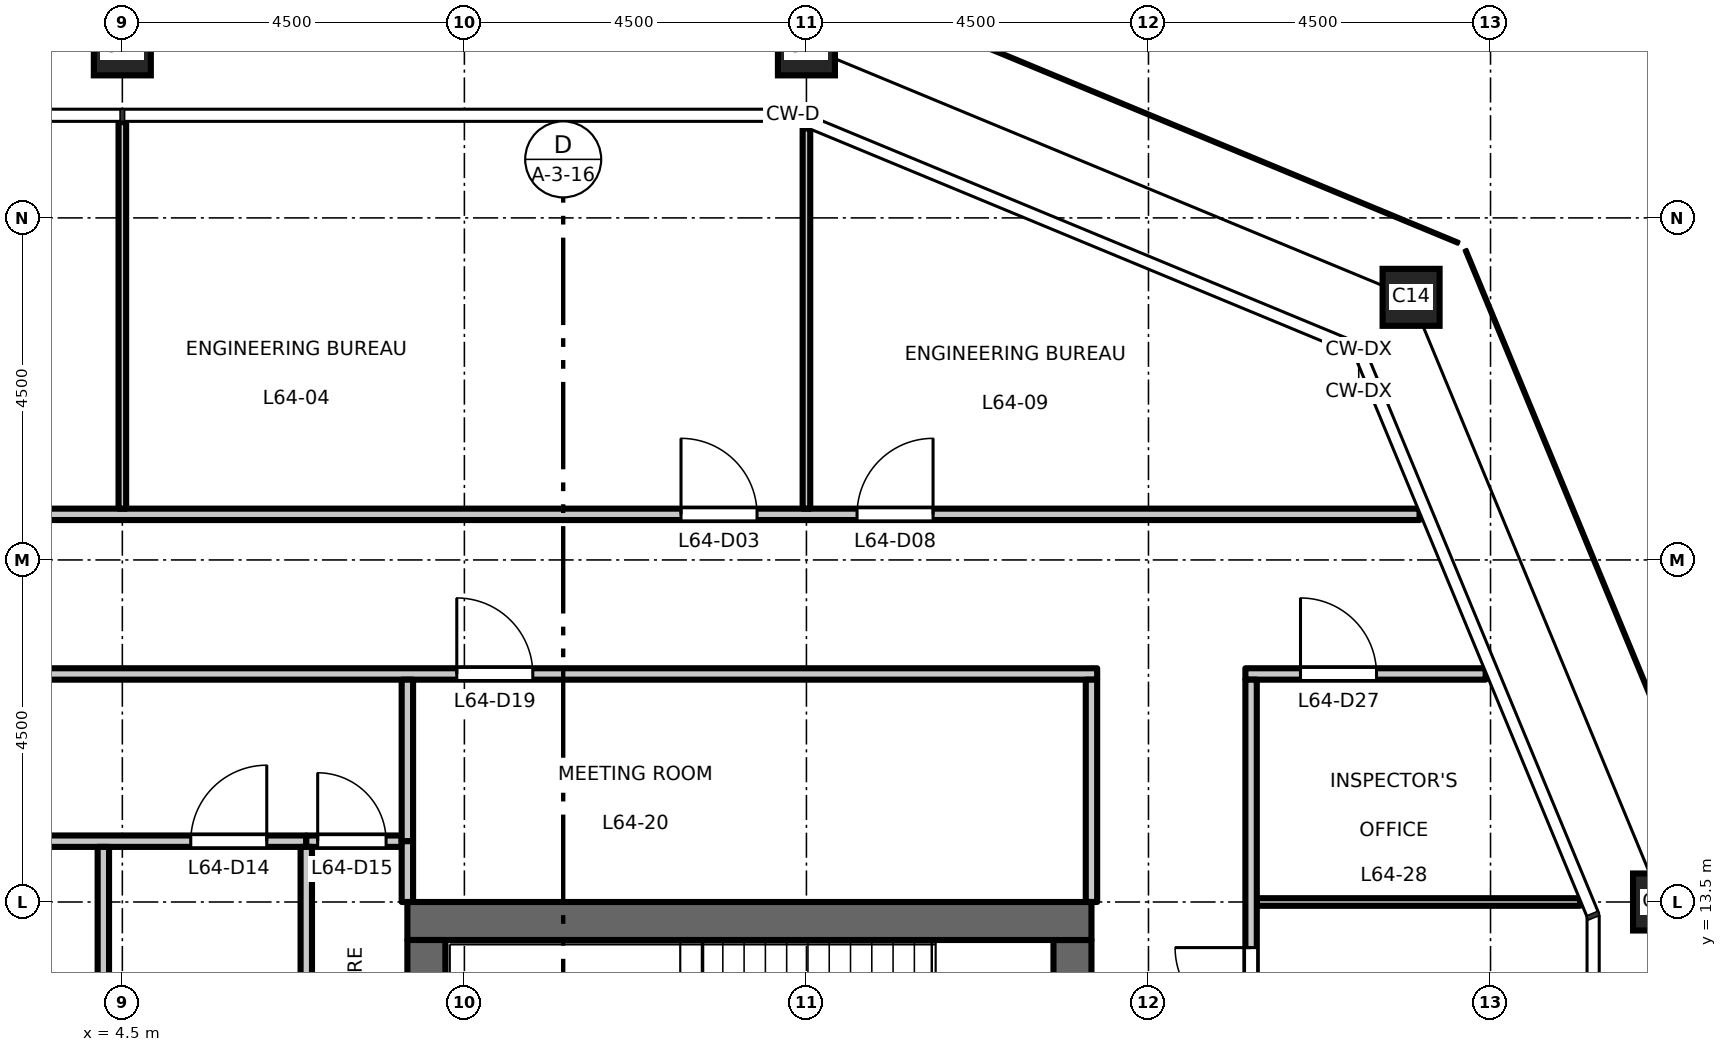
"""IFC4 building model, lengths in metres.
Left out: names, types, materials, properties, quantities, classifications, styles, units other than length and angle.
Written with IfcOpenShell. Run it as: python <this file> out.ifc"""

import sys

from ifc_helpers import new_model, si_unit, direction, frame, frame_2d, origin, origin_2d, place, context, subcontext, project, spatial, rectangle, hollow_rectangle, extrude, element, fill, save


model = new_model("IFC4")
c1 = context("Model", 3, precision=1e-05, world=origin(), true_north=direction((0.0, 1.0)))
c2 = subcontext(c1, "Body", "Model", "MODEL_VIEW")
j1 = project(units=[si_unit("LENGTHUNIT", "METRE"), si_unit("PLANEANGLEUNIT", "RADIAN")], contexts=[c1])
p1 = place(None, origin())
s1 = spatial("IfcSite", under=j1, at=p1, CompositionType="ELEMENT")
p2 = place(p1, origin())
s2 = spatial("IfcBuilding", under=s1, at=p2, CompositionType="ELEMENT")
p3 = place(p2, frame((0.0, 0.0, 298.7)))
s3 = spatial("IfcBuildingStorey", under=s2, at=p3, CompositionType="ELEMENT", Elevation=298.7)
for number, where, z_axis, x_axis in (
    (1, (24.75, 13.5, 0.0), (0.0, 0.0, 1.0), (1.0, 0.0, 0.0)),
    (2, (21.455, 21.455, 0.0), (0.0, 0.0, 1.0), (1.0, 0.0, 0.0)),
    (3, (13.5, 24.75, 0.0), (0.0, 0.0, 1.0), (1.0, 0.0, 0.0)),
    (4, (4.5, 24.75, 0.0), (0.0, 0.0, 1.0), (1.0, 0.0, 0.0)),
):
    element("IfcColumn", number, at=place(p3, frame(where, z_axis=z_axis, x_axis=x_axis)), inside=s3, PredefinedType="COLUMN", context=c2, shape_type="SweptSolid", body=[
        extrude(hollow_rectangle(XDim=0.75, YDim=0.75, WallThickness=0.04, at=origin_2d()), origin(), (0.0, 0.0, 1.0), 4.5),
    ])
p4 = place(p3, frame((17.0, -13.0, 0.0), z_axis=(0.0, 0.0, 1.0), x_axis=(0.0, 1.0, 0.0)))
e5 = element("IfcWall", 5, at=p4, inside=s3, PredefinedType="SHEAR", context=c2, shape_type="SweptSolid", body=[
    extrude(rectangle(XDim=26.0, YDim=0.5, at=frame_2d((13.0, 0.0))), origin(), (0.0, 0.0, 1.0), 4.35),
])
p5 = place(p4, frame((16.825, 0.0, 0.0)))
e6 = element("IfcOpeningElement", 6, at=p5, cuts=e5, PredefinedType="OPENING", context=c2, shape_type="SweptSolid", body=[
    extrude(rectangle(XDim=1.8, YDim=2.1, at=frame_2d((0.9, 1.05))), frame((0.0, 0.26, 0.0), z_axis=(0.0, -1.0, 0.0), x_axis=(1.0, 0.0, 0.0)), (0.0, 0.0, 1.0), 0.52),
])
p6 = place(p4, frame((7.375, 0.0, 0.0)))
e7 = element("IfcOpeningElement", 7, at=p6, cuts=e5, PredefinedType="OPENING", context=c2, shape_type="SweptSolid", body=[
    extrude(rectangle(XDim=1.8, YDim=2.1, at=frame_2d((0.9, 1.05))), frame((0.0, 0.26, 0.0), z_axis=(0.0, -1.0, 0.0), x_axis=(1.0, 0.0, 0.0)), (0.0, 0.0, 1.0), 0.52),
])
p7 = place(p3, frame((8.25, 13.25, 0.0), z_axis=(0.0, 0.0, 1.0), x_axis=(1.0, 0.0, 0.0)))
e8 = element("IfcWall", 8, at=p7, inside=s3, PredefinedType="SHEAR", context=c2, shape_type="SweptSolid", body=[
    extrude(rectangle(XDim=9.0, YDim=0.5, at=frame_2d((4.5, 0.0))), origin(), (0.0, 0.0, 1.0), 4.35),
])
p8 = place(p3, frame((8.5, -13.0, 0.0), z_axis=(0.0, 0.0, 1.0), x_axis=(0.0, 1.0, 0.0)))
e9 = element("IfcWall", 9, at=p8, inside=s3, PredefinedType="SHEAR", context=c2, shape_type="SweptSolid", body=[
    extrude(rectangle(XDim=26.0, YDim=0.5, at=frame_2d((13.0, 0.0))), origin(), (0.0, 0.0, 1.0), 4.35),
])
p9 = place(p3, frame((19.425, 13.5, 0.0), z_axis=(0.0, 0.0, 1.0), x_axis=(1.0, 0.0, 0.0)))
e10 = element("IfcWall", 10, at=p9, inside=s3, PredefinedType="PARTITIONING", context=c2, shape_type="SweptSolid", body=[
    extrude(rectangle(XDim=4.253, YDim=0.1, at=frame_2d((2.126, 0.0))), origin(), (0.0, 0.0, 1.0), 4.35),
])
p10 = place(p3, frame((-8.175, 14.3, 0.0), z_axis=(0.0, 0.0, 1.0), x_axis=(1.0, 0.0, 0.0)))
e11 = element("IfcWall", 11, at=p10, inside=s3, PredefinedType="PARTITIONING", context=c2, shape_type="SweptSolid", body=[
    extrude(rectangle(XDim=15.095, YDim=0.15, at=frame_2d((7.547, 0.0))), origin(), (0.0, 0.0, 1.0), 4.35),
])
p11 = place(p10, frame((4.575, 0.0, 0.0)))
e12 = element("IfcOpeningElement", 12, at=p11, cuts=e11, PredefinedType="OPENING", context=c2, shape_type="SweptSolid", body=[
    extrude(rectangle(XDim=1.0, YDim=2.1, at=frame_2d((0.5, 1.05))), frame((0.0, 0.085, 0.0), z_axis=(0.0, -1.0, 0.0), x_axis=(1.0, 0.0, 0.0)), (0.0, 0.0, 1.0), 0.17),
])
p12 = place(p10, frame((6.825, 0.0, 0.0)))
e13 = element("IfcOpeningElement", 13, at=p12, cuts=e11, PredefinedType="OPENING", context=c2, shape_type="SweptSolid", body=[
    extrude(rectangle(XDim=1.0, YDim=2.1, at=frame_2d((0.5, 1.05))), frame((0.0, 0.085, 0.0), z_axis=(0.0, -1.0, 0.0), x_axis=(1.0, 0.0, 0.0)), (0.0, 0.0, 1.0), 0.17),
])
p13 = place(p10, frame((13.575, 0.0, 0.0)))
e14 = element("IfcOpeningElement", 14, at=p13, cuts=e11, PredefinedType="OPENING", context=c2, shape_type="SweptSolid", body=[
    extrude(rectangle(XDim=1.0, YDim=2.1, at=frame_2d((0.5, 1.05))), frame((0.0, 0.085, 0.0), z_axis=(0.0, -1.0, 0.0), x_axis=(1.0, 0.0, 0.0)), (0.0, 0.0, 1.0), 0.17),
])
p14 = place(p3, frame((6.92, 14.3, 0.0), z_axis=(0.0, 0.0, 1.0), x_axis=(1.0, 0.0, 0.0)))
e15 = element("IfcWall", 15, at=p14, inside=s3, PredefinedType="PARTITIONING", context=c2, shape_type="SweptSolid", body=[
    extrude(rectangle(XDim=1.255, YDim=0.15, at=frame_2d((0.627, 0.0))), origin(), (0.0, 0.0, 1.0), 4.35),
])
p15 = place(p14, frame((0.15, 0.0, 0.0)))
e16 = element("IfcOpeningElement", 16, at=p15, cuts=e15, PredefinedType="OPENING", context=c2, shape_type="SweptSolid", body=[
    extrude(rectangle(XDim=0.9, YDim=2.1, at=frame_2d((0.45, 1.05))), frame((0.0, 0.085, 0.0), z_axis=(0.0, -1.0, 0.0), x_axis=(1.0, 0.0, 0.0)), (0.0, 0.0, 1.0), 0.17),
])
p16 = place(p3, frame((-17.325, 16.5, 0.0), z_axis=(0.0, 0.0, 1.0), x_axis=(1.0, 0.0, 0.0)))
e17 = element("IfcWall", 17, at=p16, inside=s3, PredefinedType="PARTITIONING", context=c2, shape_type="SweptSolid", body=[
    extrude(rectangle(XDim=34.65, YDim=0.15, at=frame_2d((17.325, 0.0))), origin(), (0.0, 0.0, 1.0), 4.35),
])
p17 = place(p16, frame((9.725, 0.0, 0.0)))
e18 = element("IfcOpeningElement", 18, at=p17, cuts=e17, PredefinedType="OPENING", context=c2, shape_type="SweptSolid", body=[
    extrude(rectangle(XDim=1.0, YDim=2.1, at=frame_2d((0.5, 1.05))), frame((0.0, 0.085, 0.0), z_axis=(0.0, -1.0, 0.0), x_axis=(1.0, 0.0, 0.0)), (0.0, 0.0, 1.0), 0.17),
])
p18 = place(p16, frame((7.475, 0.0, 0.0)))
e19 = element("IfcOpeningElement", 19, at=p18, cuts=e17, PredefinedType="OPENING", context=c2, shape_type="SweptSolid", body=[
    extrude(rectangle(XDim=1.0, YDim=2.1, at=frame_2d((0.5, 1.05))), frame((0.0, 0.085, 0.0), z_axis=(0.0, -1.0, 0.0), x_axis=(1.0, 0.0, 0.0)), (0.0, 0.0, 1.0), 0.17),
])
p19 = place(p16, frame((26.225, 0.0, 0.0)))
e20 = element("IfcOpeningElement", 20, at=p19, cuts=e17, PredefinedType="OPENING", context=c2, shape_type="SweptSolid", body=[
    extrude(rectangle(XDim=1.0, YDim=2.1, at=frame_2d((0.5, 1.05))), frame((0.0, 0.085, 0.0), z_axis=(0.0, -1.0, 0.0), x_axis=(1.0, 0.0, 0.0)), (0.0, 0.0, 1.0), 0.17),
])
p20 = place(p3, frame((19.275, 16.5, 0.0), z_axis=(0.0, 0.0, 1.0), x_axis=(1.0, 0.0, 0.0)))
e21 = element("IfcWall", 21, at=p20, inside=s3, PredefinedType="PARTITIONING", context=c2, shape_type="SweptSolid", body=[
    extrude(rectangle(XDim=3.161, YDim=0.15, at=frame_2d((1.581, 0.0))), origin(), (0.0, 0.0, 1.0), 4.35),
])
p21 = place(p20, frame((0.725, 0.0, 0.0)))
e22 = element("IfcOpeningElement", 22, at=p21, cuts=e21, PredefinedType="OPENING", context=c2, shape_type="SweptSolid", body=[
    extrude(rectangle(XDim=1.0, YDim=2.1, at=frame_2d((0.5, 1.05))), frame((0.0, 0.085, 0.0), z_axis=(0.0, -1.0, 0.0), x_axis=(1.0, 0.0, 0.0)), (0.0, 0.0, 1.0), 0.17),
])
p22 = place(p3, frame((-21.566, 18.6, 0.0), z_axis=(0.0, 0.0, 1.0), x_axis=(1.0, 0.0, 0.0)))
e23 = element("IfcWall", 23, at=p22, inside=s3, PredefinedType="PARTITIONING", context=c2, shape_type="SweptSolid", body=[
    extrude(rectangle(XDim=43.132, YDim=0.15, at=frame_2d((21.566, 0.0))), origin(), (0.0, 0.0, 1.0), 4.35),
])
p23 = place(p22, frame((15.416, 0.0, 0.0)))
e24 = element("IfcOpeningElement", 24, at=p23, cuts=e23, PredefinedType="OPENING", context=c2, shape_type="SweptSolid", body=[
    extrude(rectangle(XDim=1.0, YDim=2.1, at=frame_2d((0.5, 1.05))), frame((0.0, 0.085, 0.0), z_axis=(0.0, -1.0, 0.0), x_axis=(1.0, 0.0, 0.0)), (0.0, 0.0, 1.0), 0.17),
])
p24 = place(p22, frame((17.666, 0.0, 0.0)))
e25 = element("IfcOpeningElement", 25, at=p24, cuts=e23, PredefinedType="OPENING", context=c2, shape_type="SweptSolid", body=[
    extrude(rectangle(XDim=1.0, YDim=2.1, at=frame_2d((0.5, 1.05))), frame((0.0, 0.085, 0.0), z_axis=(0.0, -1.0, 0.0), x_axis=(1.0, 0.0, 0.0)), (0.0, 0.0, 1.0), 0.17),
])
p25 = place(p22, frame((33.416, 0.0, 0.0)))
e26 = element("IfcOpeningElement", 26, at=p25, cuts=e23, PredefinedType="OPENING", context=c2, shape_type="SweptSolid", body=[
    extrude(rectangle(XDim=1.0, YDim=2.1, at=frame_2d((0.5, 1.05))), frame((0.0, 0.085, 0.0), z_axis=(0.0, -1.0, 0.0), x_axis=(1.0, 0.0, 0.0)), (0.0, 0.0, 1.0), 0.17),
])
p26 = place(p22, frame((6.416, 0.0, 0.0)))
e27 = element("IfcOpeningElement", 27, at=p26, cuts=e23, PredefinedType="OPENING", context=c2, shape_type="SweptSolid", body=[
    extrude(rectangle(XDim=1.0, YDim=2.1, at=frame_2d((0.5, 1.05))), frame((0.0, 0.085, 0.0), z_axis=(0.0, -1.0, 0.0), x_axis=(1.0, 0.0, 0.0)), (0.0, 0.0, 1.0), 0.17),
])
p27 = place(p22, frame((35.732, 0.0, 0.0)))
e28 = element("IfcOpeningElement", 28, at=p27, cuts=e23, PredefinedType="OPENING", context=c2, shape_type="SweptSolid", body=[
    extrude(rectangle(XDim=1.0, YDim=2.1, at=frame_2d((0.5, 1.05))), frame((0.0, 0.085, 0.0), z_axis=(0.0, -1.0, 0.0), x_axis=(1.0, 0.0, 0.0)), (0.0, 0.0, 1.0), 0.17),
])
p28 = place(p3, frame((4.25, 8.37, 0.0), z_axis=(0.0, 0.0, 1.0), x_axis=(0.0, 1.0, 0.0)))
e29 = element("IfcWall", 29, at=p28, inside=s3, PredefinedType="PARTITIONING", context=c2, shape_type="SweptSolid", body=[
    extrude(rectangle(XDim=5.855, YDim=0.15, at=frame_2d((2.927, 0.0))), origin(), (0.0, 0.0, 1.0), 4.35),
])
p29 = place(p3, frame((4.5, 18.675, 0.0), z_axis=(0.0, 0.0, 1.0), x_axis=(0.0, 1.0, 0.0)))
e30 = element("IfcWall", 30, at=p29, inside=s3, PredefinedType="PARTITIONING", context=c2, shape_type="SweptSolid", body=[
    extrude(rectangle(XDim=5.085, YDim=0.1, at=frame_2d((2.542, 0.0))), origin(), (0.0, 0.0, 1.0), 3.65),
])
p30 = place(p3, frame((6.92, 8.029, 0.0), z_axis=(0.0, 0.0, 1.0), x_axis=(0.0, 1.0, 0.0)))
e31 = element("IfcWall", 31, at=p30, inside=s3, PredefinedType="PARTITIONING", context=c2, shape_type="SweptSolid", body=[
    extrude(rectangle(XDim=6.196, YDim=0.15, at=frame_2d((3.098, 0.0))), origin(), (0.0, 0.0, 1.0), 4.35),
])
p31 = place(p3, frame((8.25, 14.3, 0.0), z_axis=(0.0, 0.0, 1.0), x_axis=(0.0, 1.0, 0.0)))
e32 = element("IfcWall", 32, at=p31, inside=s3, PredefinedType="PARTITIONING", context=c2, shape_type="SweptSolid", body=[
    extrude(rectangle(XDim=2.125, YDim=0.15, at=frame_2d((1.062, 0.0))), origin(), (0.0, 0.0, 1.0), 4.35),
])
p32 = place(p3, frame((8.25, 13.5, 0.0), z_axis=(0.0, 0.0, 1.0), x_axis=(0.0, 1.0, 0.0)))
e33 = element("IfcWall", 33, at=p32, inside=s3, PredefinedType="PARTITIONING", context=c2, shape_type="SweptSolid", body=[
    extrude(rectangle(XDim=0.8, YDim=0.15, at=frame_2d((0.4, 0.0))), origin(), (0.0, 0.0, 1.0), 4.35),
])
p33 = place(p3, frame((13.5, 18.675, 0.0), z_axis=(0.0, 0.0, 1.0), x_axis=(0.0, 1.0, 0.0)))
e34 = element("IfcWall", 34, at=p33, inside=s3, PredefinedType="PARTITIONING", context=c2, shape_type="SweptSolid", body=[
    extrude(rectangle(XDim=5.003, YDim=0.1, at=frame_2d((2.501, 0.0))), origin(), (0.0, 0.0, 1.0), 3.75),
])
p34 = place(p3, frame((17.25, 13.5, 0.0), z_axis=(0.0, 0.0, 1.0), x_axis=(0.0, 1.0, 0.0)))
e35 = element("IfcWall", 35, at=p34, inside=s3, PredefinedType="PARTITIONING", context=c2, shape_type="SweptSolid", body=[
    extrude(rectangle(XDim=2.925, YDim=0.15, at=frame_2d((1.462, 0.0))), origin(), (0.0, 0.0, 1.0), 4.35),
])
p35 = place(p3, frame((19.35, -16.42, 0.0), z_axis=(0.0, 0.0, 1.0), x_axis=(0.0, 1.0, 0.0)))
e36 = element("IfcWall", 36, at=p35, inside=s3, PredefinedType="PARTITIONING", context=c2, shape_type="SweptSolid", body=[
    extrude(rectangle(XDim=32.845, YDim=0.15, at=frame_2d((16.422, 0.0))), origin(), (0.0, 0.0, 1.0), 4.35),
])
p36 = place(p35, frame((10.32, 0.0, 0.0)))
e37 = element("IfcOpeningElement", 37, at=p36, cuts=e36, PredefinedType="OPENING", context=c2, shape_type="SweptSolid", body=[
    extrude(rectangle(XDim=1.0, YDim=2.1, at=frame_2d((0.5, 1.05))), frame((0.0, 0.085, 0.0), z_axis=(0.0, -1.0, 0.0), x_axis=(1.0, 0.0, 0.0)), (0.0, 0.0, 1.0), 0.17),
])
p37 = place(p35, frame((12.57, 0.0, 0.0)))
e38 = element("IfcOpeningElement", 38, at=p37, cuts=e36, PredefinedType="OPENING", context=c2, shape_type="SweptSolid", body=[
    extrude(rectangle(XDim=1.0, YDim=2.1, at=frame_2d((0.5, 1.05))), frame((0.0, 0.085, 0.0), z_axis=(0.0, -1.0, 0.0), x_axis=(1.0, 0.0, 0.0)), (0.0, 0.0, 1.0), 0.17),
])
p38 = place(p35, frame((28.32, 0.0, 0.0)))
e39 = element("IfcOpeningElement", 39, at=p38, cuts=e36, PredefinedType="OPENING", context=c2, shape_type="SweptSolid", body=[
    extrude(rectangle(XDim=1.0, YDim=2.1, at=frame_2d((0.5, 1.05))), frame((0.0, 0.085, 0.0), z_axis=(0.0, -1.0, 0.0), x_axis=(1.0, 0.0, 0.0)), (0.0, 0.0, 1.0), 0.17),
])
p39 = place(p25, origin())
e40 = element("IfcDoor", 40, at=p39, inside=s3, OperationType="SINGLE_SWING_LEFT", PredefinedType="DOOR", context=c2, shape_type="SweptSolid", body=[
    extrude(rectangle(XDim=1.0, YDim=2.1, at=frame_2d((0.5, 1.05))), frame((0.0, 0.025, 0.0), z_axis=(0.0, -1.0, 0.0), x_axis=(1.0, 0.0, 0.0)), (0.0, 0.0, 1.0), 0.05),
])
fill(e26, e40)
p40 = place(p27, origin())
e41 = element("IfcDoor", 41, at=p40, inside=s3, OperationType="SINGLE_SWING_RIGHT", PredefinedType="DOOR", context=c2, shape_type="SweptSolid", body=[
    extrude(rectangle(XDim=1.0, YDim=2.1, at=frame_2d((0.5, 1.05))), frame((0.0, 0.025, 0.0), z_axis=(0.0, -1.0, 0.0), x_axis=(1.0, 0.0, 0.0)), (0.0, 0.0, 1.0), 0.05),
])
fill(e28, e41)
p41 = place(p13, origin())
e42 = element("IfcDoor", 42, at=p41, inside=s3, OperationType="SINGLE_SWING_RIGHT", PredefinedType="DOOR", context=c2, shape_type="SweptSolid", body=[
    extrude(rectangle(XDim=1.0, YDim=2.1, at=frame_2d((0.5, 1.05))), frame((0.0, 0.025, 0.0), z_axis=(0.0, -1.0, 0.0), x_axis=(1.0, 0.0, 0.0)), (0.0, 0.0, 1.0), 0.05),
])
fill(e14, e42)
p42 = place(p15, origin())
e43 = element("IfcDoor", 43, at=p42, inside=s3, OperationType="SINGLE_SWING_LEFT", PredefinedType="DOOR", context=c2, shape_type="SweptSolid", body=[
    extrude(rectangle(XDim=0.9, YDim=2.1, at=frame_2d((0.45, 1.05))), frame((0.0, 0.025, 0.0), z_axis=(0.0, -1.0, 0.0), x_axis=(1.0, 0.0, 0.0)), (0.0, 0.0, 1.0), 0.05),
])
fill(e16, e43)
p43 = place(p19, origin())
e44 = element("IfcDoor", 44, at=p43, inside=s3, OperationType="SINGLE_SWING_LEFT", PredefinedType="DOOR", context=c2, shape_type="SweptSolid", body=[
    extrude(rectangle(XDim=1.0, YDim=2.1, at=frame_2d((0.5, 1.05))), frame((0.0, 0.025, 0.0), z_axis=(0.0, -1.0, 0.0), x_axis=(1.0, 0.0, 0.0)), (0.0, 0.0, 1.0), 0.05),
])
fill(e20, e44)
p44 = place(p38, origin())
e45 = element("IfcDoor", 45, at=p44, inside=s3, OperationType="SINGLE_SWING_RIGHT", PredefinedType="DOOR", context=c2, shape_type="SweptSolid", body=[
    extrude(rectangle(XDim=1.0, YDim=2.1, at=frame_2d((0.5, 1.05))), frame((0.0, 0.025, 0.0), z_axis=(0.0, -1.0, 0.0), x_axis=(1.0, 0.0, 0.0)), (0.0, 0.0, 1.0), 0.05),
])
fill(e39, e45)
p45 = place(p21, origin())
e46 = element("IfcDoor", 46, at=p45, inside=s3, OperationType="SINGLE_SWING_LEFT", PredefinedType="DOOR", context=c2, shape_type="SweptSolid", body=[
    extrude(rectangle(XDim=1.0, YDim=2.1, at=frame_2d((0.5, 1.05))), frame((0.0, 0.025, 0.0), z_axis=(0.0, -1.0, 0.0), x_axis=(1.0, 0.0, 0.0)), (0.0, 0.0, 1.0), 0.05),
])
fill(e22, e46)
save(model, sys.argv[1])
